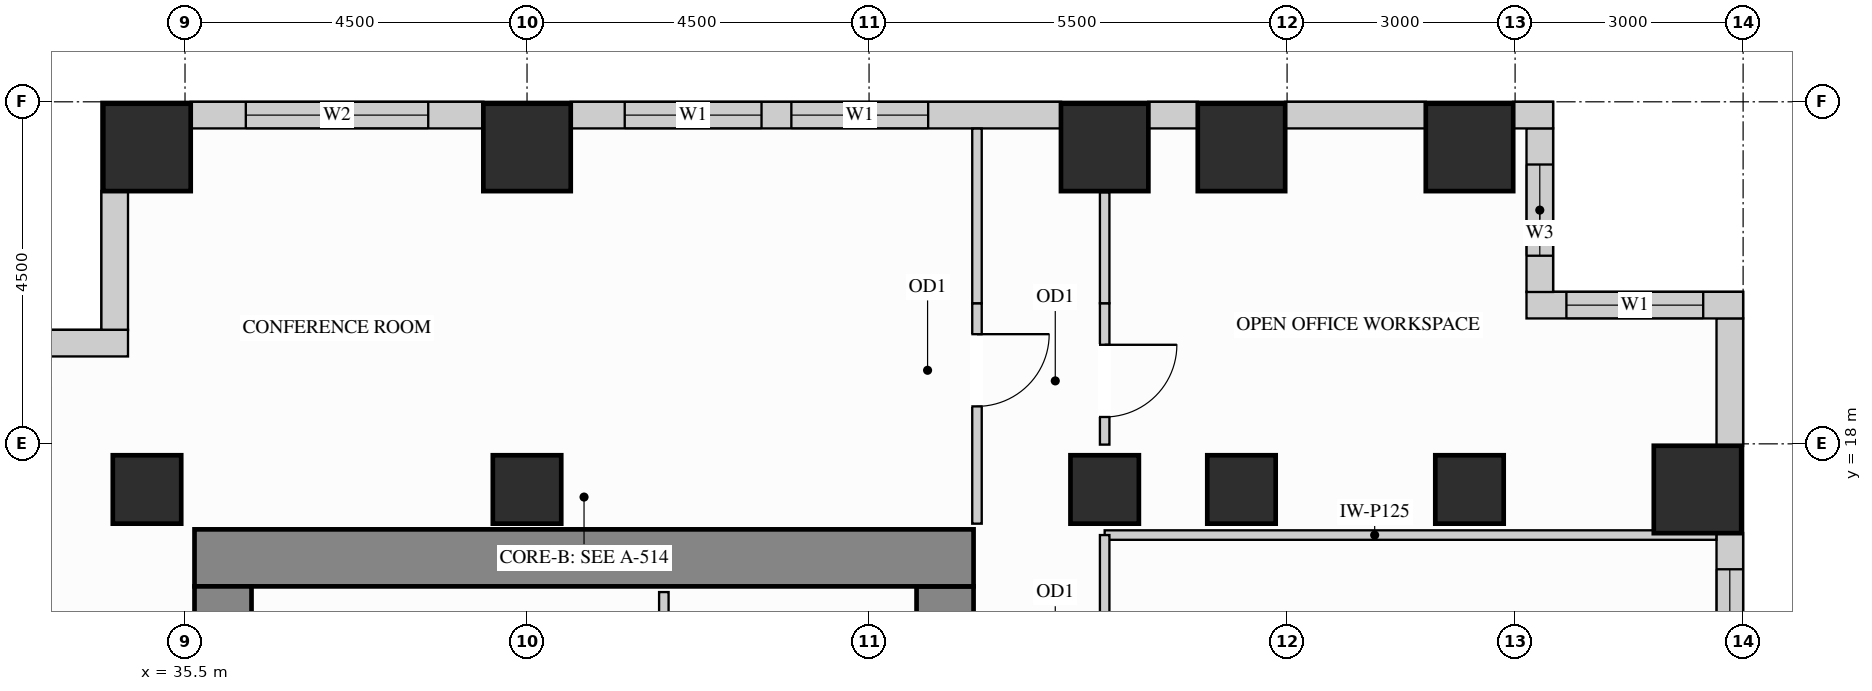
"""IFC4 building model, lengths in metres.
Left out: names, types, materials, properties, quantities, classifications, styles, units other than length and angle.
Written with IfcOpenShell. Run it as: python <this file> out.ifc"""

import sys

from ifc_helpers import new_model, si_unit, direction, frame, frame_2d, origin, origin_2d, place, context, subcontext, project, spatial, rectangle, extrude, source, transform, mapped, element, fill, save


model = new_model("IFC4")
c1 = context("Model", 3, precision=1e-05, world=origin(), true_north=direction((0.0, 1.0)))
c2 = subcontext(c1, "Body", "Model", "MODEL_VIEW")
j1 = project(units=[si_unit("LENGTHUNIT", "METRE"), si_unit("PLANEANGLEUNIT", "RADIAN")], contexts=[c1])
p1 = place(None, origin())
s1 = spatial("IfcSite", under=j1, at=p1, CompositionType="ELEMENT")
p2 = place(p1, origin())
s2 = spatial("IfcBuilding", under=s1, at=p2, CompositionType="ELEMENT")
p3 = place(p2, frame((0.0, 0.0, 131.4)))
s3 = spatial("IfcBuildingStorey", under=s2, at=p3, CompositionType="ELEMENT", Elevation=131.4)
m1 = source(origin(), c2, "Body", "SweptSolid", [
    extrude(rectangle(XDim=0.9, YDim=0.9, at=origin_2d()), origin(), (0.0, 0.0, 1.0), 3.38),
])
for number, where, z_axis, x_axis in (
    (1, (35.0, 17.4, 0.0), (0.0, 0.0, 1.0), (1.0, 0.0, 0.0)),
    (2, (40.0, 17.4, 0.0), (0.0, 0.0, 1.0), (1.0, 0.0, 0.0)),
    (3, (47.6, 17.4, 0.0), (0.0, 0.0, 1.0), (1.0, 0.0, 0.0)),
    (4, (49.4, 17.4, 0.0), (0.0, 0.0, 1.0), (1.0, 0.0, 0.0)),
    (5, (52.4, 17.4, 0.0), (0.0, 0.0, 1.0), (1.0, 0.0, 0.0)),
):
    element("IfcColumn", number, at=place(p3, frame(where, z_axis=z_axis, x_axis=x_axis)), inside=s3, PredefinedType="COLUMN", context=c2, shape_type="MappedRepresentation", body=[
        mapped(m1, transform((0.0, 0.0, 0.0), x_axis=(1.0, 0.0, 0.0), y_axis=(0.0, 1.0, 0.0), z_axis=(0.0, 0.0, 1.0))),
    ])
m2 = source(origin(), c2, "Body", "SweptSolid", [
    extrude(rectangle(XDim=1.15, YDim=1.15, at=origin_2d()), origin(), (0.0, 0.0, 1.0), 3.38),
])
for number, where, z_axis, x_axis in (
    (6, (35.0, 21.9, 0.0), (0.0, 0.0, 1.0), (1.0, 0.0, 0.0)),
    (7, (40.0, 21.9, 0.0), (0.0, 0.0, 1.0), (1.0, 0.0, 0.0)),
    (8, (47.6, 21.9, 0.0), (0.0, 0.0, 1.0), (1.0, 0.0, 0.0)),
    (9, (49.4, 21.9, 0.0), (0.0, 0.0, 1.0), (1.0, 0.0, 0.0)),
    (10, (52.4, 21.9, 0.0), (0.0, 0.0, 1.0), (1.0, 0.0, 0.0)),
    (11, (55.4, 17.4, 0.0), (0.0, 0.0, 1.0), (1.0, 0.0, 0.0)),
):
    element("IfcColumn", number, at=place(p3, frame(where, z_axis=z_axis, x_axis=x_axis)), inside=s3, PredefinedType="COLUMN", context=c2, shape_type="MappedRepresentation", body=[
        mapped(m2, transform((0.0, 0.0, 0.0), x_axis=(1.0, 0.0, 0.0), y_axis=(0.0, 1.0, 0.0), z_axis=(0.0, 0.0, 1.0))),
    ])
m3 = source(origin(), c2, "Body", "SweptSolid", [
    extrude(rectangle(XDim=3.725, YDim=0.75, at=frame_2d((1.863, 0.0))), origin(), (0.0, 0.0, 1.0), 3.38),
])
p4 = place(p3, frame((45.5, 12.4, 0.0), z_axis=(0.0, 0.0, 1.0), x_axis=(0.0, 1.0, 0.0)))
e12 = element("IfcWall", 12, at=p4, inside=s3, PredefinedType="SHEAR", context=c2, shape_type="MappedRepresentation", body=[
    mapped(m3, transform((0.0, 0.0, 0.0), x_axis=(1.0, 0.0, 0.0), y_axis=(0.0, 1.0, 0.0), z_axis=(0.0, 0.0, 1.0))),
])
m4 = source(origin(), c2, "Body", "SweptSolid", [
    extrude(rectangle(XDim=10.25, YDim=0.75, at=frame_2d((5.125, 0.0))), origin(), (0.0, 0.0, 1.0), 3.38),
])
p5 = place(p3, frame((35.625, 16.5, 0.0), z_axis=(0.0, 0.0, 1.0), x_axis=(1.0, 0.0, 0.0)))
e13 = element("IfcWall", 13, at=p5, inside=s3, PredefinedType="SHEAR", context=c2, shape_type="MappedRepresentation", body=[
    mapped(m4, transform((0.0, 0.0, 0.0), x_axis=(1.0, 0.0, 0.0), y_axis=(0.0, 1.0, 0.0), z_axis=(0.0, 0.0, 1.0))),
])
p6 = place(p3, frame((36.0, 12.4, 0.0), z_axis=(0.0, 0.0, 1.0), x_axis=(0.0, 1.0, 0.0)))
e14 = element("IfcWall", 14, at=p6, inside=s3, PredefinedType="SHEAR", context=c2, shape_type="MappedRepresentation", body=[
    mapped(m3, transform((0.0, 0.0, 0.0), x_axis=(1.0, 0.0, 0.0), y_axis=(0.0, 1.0, 0.0), z_axis=(0.0, 0.0, 1.0))),
])
p7 = place(p3, frame((55.825, 14.073, 0.0), z_axis=(0.0, 0.0, 1.0), x_axis=(0.0, 1.0, 0.0)))
e15 = element("IfcWall", 15, at=p7, inside=s3, PredefinedType="SOLIDWALL", context=c2, shape_type="SweptSolid", body=[
    extrude(rectangle(XDim=2.754, YDim=0.35, at=frame_2d((1.377, 0.0))), origin(), (0.0, 0.0, 1.0), 3.365),
])
p8 = place(p7, frame((0.477, 0.0, 0.78)))
e16 = element("IfcOpeningElement", 16, at=p8, cuts=e15, PredefinedType="OPENING", context=c2, shape_type="SweptSolid", body=[
    extrude(rectangle(XDim=1.8, YDim=2.1, at=frame_2d((0.9, 1.05))), frame((0.0, 0.185, 0.0), z_axis=(0.0, -1.0, 0.0), x_axis=(1.0, 0.0, 0.0)), (0.0, 0.0, 1.0), 0.37),
])
m5 = source(origin(), c2, "Body", "SweptSolid", [
    extrude(rectangle(XDim=1.679, YDim=0.35, at=frame_2d((0.84, 0.0))), origin(), (0.0, 0.0, 1.0), 3.365),
])
p9 = place(p3, frame((55.825, 17.973, 0.0), z_axis=(0.0, 0.0, 1.0), x_axis=(0.0, 1.0, 0.0)))
e17 = element("IfcWall", 17, at=p9, inside=s3, PredefinedType="SOLIDWALL", context=c2, shape_type="MappedRepresentation", body=[
    mapped(m5, transform((0.0, 0.0, 0.0), x_axis=(1.0, 0.0, 0.0), y_axis=(0.0, 1.0, 0.0), z_axis=(0.0, 0.0, 1.0))),
])
p10 = place(p3, frame((56.0, 19.825, 0.0), z_axis=(0.0, 0.0, 1.0), x_axis=(-1.0, 0.0, 0.0)))
e18 = element("IfcWall", 18, at=p10, inside=s3, PredefinedType="SOLIDWALL", context=c2, shape_type="SweptSolid", body=[
    extrude(rectangle(XDim=2.85, YDim=0.35, at=frame_2d((1.425, 0.0))), origin(), (0.0, 0.0, 1.0), 3.365),
])
p11 = place(p10, frame((0.525, 0.0, 0.78)))
e19 = element("IfcOpeningElement", 19, at=p11, cuts=e18, PredefinedType="OPENING", context=c2, shape_type="SweptSolid", body=[
    extrude(rectangle(XDim=1.8, YDim=2.1, at=frame_2d((0.9, 1.05))), frame((0.0, 0.185, 0.0), z_axis=(0.0, -1.0, 0.0), x_axis=(1.0, 0.0, 0.0)), (0.0, 0.0, 1.0), 0.37),
])
p12 = place(p3, frame((53.325, 19.998, 0.0), z_axis=(0.0, 0.0, 1.0), x_axis=(0.0, 1.0, 0.0)))
e20 = element("IfcWall", 20, at=p12, inside=s3, PredefinedType="SOLIDWALL", context=c2, shape_type="SweptSolid", body=[
    extrude(rectangle(XDim=2.154, YDim=0.35, at=frame_2d((1.077, 0.0))), origin(), (0.0, 0.0, 1.0), 3.365),
])
p13 = place(p12, frame((0.477, 0.0, 0.78)))
e21 = element("IfcOpeningElement", 21, at=p13, cuts=e20, PredefinedType="OPENING", context=c2, shape_type="SweptSolid", body=[
    extrude(rectangle(XDim=1.2, YDim=2.1, at=frame_2d((0.6, 1.05))), frame((0.0, 0.185, 0.0), z_axis=(0.0, -1.0, 0.0), x_axis=(1.0, 0.0, 0.0)), (0.0, 0.0, 1.0), 0.37),
])
m6 = source(origin(), c2, "Body", "SweptSolid", [
    extrude(rectangle(XDim=0.527, YDim=0.35, at=frame_2d((0.264, 0.0))), origin(), (0.0, 0.0, 1.0), 3.365),
])
p14 = place(p3, frame((53.5, 22.325, 0.0), z_axis=(0.0, 0.0, 1.0), x_axis=(-1.0, 0.0, 0.0)))
e22 = element("IfcWall", 22, at=p14, inside=s3, PredefinedType="SOLIDWALL", context=c2, shape_type="MappedRepresentation", body=[
    mapped(m6, transform((0.0, 0.0, 0.0), x_axis=(1.0, 0.0, 0.0), y_axis=(0.0, 1.0, 0.0), z_axis=(0.0, 0.0, 1.0))),
])
m7 = source(origin(), c2, "Body", "SweptSolid", [
    extrude(rectangle(XDim=1.854, YDim=0.35, at=frame_2d((0.927, 0.0))), origin(), (0.0, 0.0, 1.0), 3.365),
])
p15 = place(p3, frame((51.827, 22.325, 0.0), z_axis=(0.0, 0.0, 1.0), x_axis=(-1.0, 0.0, 0.0)))
e23 = element("IfcWall", 23, at=p15, inside=s3, PredefinedType="SOLIDWALL", context=c2, shape_type="MappedRepresentation", body=[
    mapped(m7, transform((0.0, 0.0, 0.0), x_axis=(1.0, 0.0, 0.0), y_axis=(0.0, 1.0, 0.0), z_axis=(0.0, 0.0, 1.0))),
])
m8 = source(origin(), c2, "Body", "SweptSolid", [
    extrude(rectangle(XDim=0.654, YDim=0.35, at=frame_2d((0.327, 0.0))), origin(), (0.0, 0.0, 1.0), 3.365),
])
p16 = place(p3, frame((48.827, 22.325, 0.0), z_axis=(0.0, 0.0, 1.0), x_axis=(-1.0, 0.0, 0.0)))
e24 = element("IfcWall", 24, at=p16, inside=s3, PredefinedType="SOLIDWALL", context=c2, shape_type="MappedRepresentation", body=[
    mapped(m8, transform((0.0, 0.0, 0.0), x_axis=(1.0, 0.0, 0.0), y_axis=(0.0, 1.0, 0.0), z_axis=(0.0, 0.0, 1.0))),
])
p17 = place(p3, frame((47.027, 22.325, 0.0), z_axis=(0.0, 0.0, 1.0), x_axis=(-1.0, 0.0, 0.0)))
e25 = element("IfcWall", 25, at=p17, inside=s3, PredefinedType="SOLIDWALL", context=c2, shape_type="SweptSolid", body=[
    extrude(rectangle(XDim=6.454, YDim=0.35, at=frame_2d((3.227, 0.0))), origin(), (0.0, 0.0, 1.0), 3.365),
])
p18 = place(p17, frame((1.749, 0.0, 0.78)))
e26 = element("IfcOpeningElement", 26, at=p18, cuts=e25, PredefinedType="OPENING", context=c2, shape_type="SweptSolid", body=[
    extrude(rectangle(XDim=1.8, YDim=2.1, at=frame_2d((0.9, 1.05))), frame((0.0, 0.185, 0.0), z_axis=(0.0, -1.0, 0.0), x_axis=(1.0, 0.0, 0.0)), (0.0, 0.0, 1.0), 0.37),
])
p19 = place(p17, frame((3.942, 0.0, 0.78)))
e27 = element("IfcOpeningElement", 27, at=p19, cuts=e25, PredefinedType="OPENING", context=c2, shape_type="SweptSolid", body=[
    extrude(rectangle(XDim=1.8, YDim=2.1, at=frame_2d((0.9, 1.05))), frame((0.0, 0.185, 0.0), z_axis=(0.0, -1.0, 0.0), x_axis=(1.0, 0.0, 0.0)), (0.0, 0.0, 1.0), 0.37),
])
p20 = place(p3, frame((39.427, 22.325, 0.0), z_axis=(0.0, 0.0, 1.0), x_axis=(-1.0, 0.0, 0.0)))
e28 = element("IfcWall", 28, at=p20, inside=s3, PredefinedType="SOLIDWALL", context=c2, shape_type="SweptSolid", body=[
    extrude(rectangle(XDim=3.854, YDim=0.35, at=frame_2d((1.927, 0.0))), origin(), (0.0, 0.0, 1.0), 3.365),
])
p21 = place(p20, frame((0.727, 0.0, 0.78)))
e29 = element("IfcOpeningElement", 29, at=p21, cuts=e28, PredefinedType="OPENING", context=c2, shape_type="SweptSolid", body=[
    extrude(rectangle(XDim=2.4, YDim=2.1, at=frame_2d((1.2, 1.05))), frame((0.0, 0.185, 0.0), z_axis=(0.0, -1.0, 0.0), x_axis=(1.0, 0.0, 0.0)), (0.0, 0.0, 1.0), 0.37),
])
m9 = source(origin(), c2, "Body", "SweptSolid", [
    extrude(rectangle(XDim=1.829, YDim=0.35, at=frame_2d((0.915, 0.0))), origin(), (0.0, 0.0, 1.0), 3.365),
])
p22 = place(p3, frame((34.575, 21.327, 0.0), z_axis=(0.0, 0.0, 1.0), x_axis=(0.0, -1.0, 0.0)))
e30 = element("IfcWall", 30, at=p22, inside=s3, PredefinedType="SOLIDWALL", context=c2, shape_type="MappedRepresentation", body=[
    mapped(m9, transform((0.0, 0.0, 0.0), x_axis=(1.0, 0.0, 0.0), y_axis=(0.0, 1.0, 0.0), z_axis=(0.0, 0.0, 1.0))),
])
p23 = place(p3, frame((34.75, 19.325, 0.0), z_axis=(0.0, 0.0, 1.0), x_axis=(-1.0, 0.0, 0.0)))
e31 = element("IfcWall", 31, at=p23, inside=s3, PredefinedType="SOLIDWALL", context=c2, shape_type="SweptSolid", body=[
    extrude(rectangle(XDim=15.6, YDim=0.35, at=frame_2d((7.8, 0.0))), origin(), (0.0, 0.0, 1.0), 3.365),
])
p24 = place(p23, frame((4.307, 0.0, 0.78)))
e32 = element("IfcOpeningElement", 32, at=p24, cuts=e31, PredefinedType="OPENING", context=c2, shape_type="SweptSolid", body=[
    extrude(rectangle(XDim=1.5, YDim=2.0, at=frame_2d((0.75, 1.0))), frame((0.0, 0.185, 0.0), z_axis=(0.0, -1.0, 0.0), x_axis=(1.0, 0.0, 0.0)), (0.0, 0.0, 1.0), 0.37),
])
p25 = place(p23, frame((9.793, 0.0, 0.78)))
e33 = element("IfcOpeningElement", 33, at=p25, cuts=e31, PredefinedType="OPENING", context=c2, shape_type="SweptSolid", body=[
    extrude(rectangle(XDim=1.5, YDim=2.0, at=frame_2d((0.75, 1.0))), frame((0.0, 0.185, 0.0), z_axis=(0.0, -1.0, 0.0), x_axis=(1.0, 0.0, 0.0)), (0.0, 0.0, 1.0), 0.37),
])
m10 = source(origin(), c2, "Body", "SweptSolid", [
    extrude(rectangle(XDim=1.93, YDim=0.125, at=frame_2d((0.965, 0.0))), origin(), (0.0, 0.0, 1.0), 3.365),
])
p26 = place(p3, frame((41.8, 14.12, 0.0), z_axis=(0.0, 0.0, 1.0), x_axis=(0.0, 1.0, 0.0)))
e34 = element("IfcWall", 34, at=p26, inside=s3, PredefinedType="PARTITIONING", context=c2, shape_type="MappedRepresentation", body=[
    mapped(m10, transform((0.0, 0.0, 0.0), x_axis=(1.0, 0.0, 0.0), y_axis=(0.0, 1.0, 0.0), z_axis=(0.0, 0.0, 1.0))),
])
m11 = source(origin(), c2, "Body", "SweptSolid", [
    extrude(rectangle(XDim=8.048, YDim=0.125, at=frame_2d((4.024, 0.0))), origin(), (0.0, 0.0, 1.0), 3.365),
])
p27 = place(p3, frame((47.6, 16.8, 0.0), z_axis=(0.0, 0.0, 1.0), x_axis=(1.0, 0.0, 0.0)))
e35 = element("IfcWall", 35, at=p27, inside=s3, PredefinedType="PARTITIONING", context=c2, shape_type="MappedRepresentation", body=[
    mapped(m11, transform((0.0, 0.0, 0.0), x_axis=(1.0, 0.0, 0.0), y_axis=(0.0, 1.0, 0.0), z_axis=(0.0, 0.0, 1.0))),
])
p28 = place(p3, frame((47.6, 14.09, 0.0), z_axis=(0.0, 0.0, 1.0), x_axis=(0.0, 1.0, 0.0)))
e36 = element("IfcWall", 36, at=p28, inside=s3, PredefinedType="PARTITIONING", context=c2, shape_type="SweptSolid", body=[
    extrude(rectangle(XDim=2.71, YDim=0.125, at=frame_2d((1.355, 0.0))), origin(), (0.0, 0.0, 1.0), 2.677),
])
p29 = place(p28, frame((0.38, 0.0, 0.0)))
e37 = element("IfcOpeningElement", 37, at=p29, cuts=e36, PredefinedType="OPENING", context=c2, shape_type="SweptSolid", body=[
    extrude(rectangle(XDim=0.95, YDim=2.15, at=frame_2d((0.475, 1.075))), frame((0.0, 0.073, 0.0), z_axis=(0.0, -1.0, 0.0), x_axis=(1.0, 0.0, 0.0)), (0.0, 0.0, 1.0), 0.145),
])
p30 = place(p3, frame((47.6, 17.99, 0.0), z_axis=(0.0, 0.0, 1.0), x_axis=(0.0, 1.0, 0.0)))
e38 = element("IfcWall", 38, at=p30, inside=s3, PredefinedType="PARTITIONING", context=c2, shape_type="SweptSolid", body=[
    extrude(rectangle(XDim=1.86, YDim=0.125, at=frame_2d((0.93, 0.0))), origin(), (0.0, 0.0, 1.0), 2.677),
])
p31 = place(p30, frame((0.363, 0.0, 0.0)))
e39 = element("IfcOpeningElement", 39, at=p31, cuts=e38, PredefinedType="OPENING", context=c2, shape_type="SweptSolid", body=[
    extrude(rectangle(XDim=0.95, YDim=2.15, at=frame_2d((0.475, 1.075))), frame((0.0, 0.073, 0.0), z_axis=(0.0, -1.0, 0.0), x_axis=(1.0, 0.0, 0.0)), (0.0, 0.0, 1.0), 0.145),
])
m12 = source(origin(), c2, "Body", "SweptSolid", [
    extrude(rectangle(XDim=1.46, YDim=0.125, at=frame_2d((0.73, 0.0))), origin(), (0.0, 0.0, 1.0), 2.677),
])
p32 = place(p3, frame((47.6, 19.85, 0.0), z_axis=(0.0, 0.0, 1.0), x_axis=(0.0, 1.0, 0.0)))
e40 = element("IfcWall", 40, at=p32, inside=s3, PredefinedType="PARTITIONING", context=c2, shape_type="MappedRepresentation", body=[
    mapped(m12, transform((0.0, 0.0, 0.0), x_axis=(1.0, 0.0, 0.0), y_axis=(0.0, 1.0, 0.0), z_axis=(0.0, 0.0, 1.0))),
])
p33 = place(p3, frame((45.92, 16.95, 0.0), z_axis=(0.0, 0.0, 1.0), x_axis=(0.0, 1.0, 0.0)))
e41 = element("IfcWall", 41, at=p33, inside=s3, PredefinedType="PARTITIONING", context=c2, shape_type="SweptSolid", body=[
    extrude(rectangle(XDim=2.9, YDim=0.125, at=frame_2d((1.45, 0.0))), origin(), (0.0, 0.0, 1.0), 3.365),
])
p34 = place(p33, frame((1.543, 0.0, 0.0)))
e42 = element("IfcOpeningElement", 42, at=p34, cuts=e41, PredefinedType="OPENING", context=c2, shape_type="SweptSolid", body=[
    extrude(rectangle(XDim=0.95, YDim=2.15, at=frame_2d((0.475, 1.075))), frame((0.0, 0.073, 0.0), z_axis=(0.0, -1.0, 0.0), x_axis=(1.0, 0.0, 0.0)), (0.0, 0.0, 1.0), 0.145),
])
m13 = source(origin(), c2, "Body", "SweptSolid", [
    extrude(rectangle(XDim=2.298, YDim=0.125, at=frame_2d((1.149, 0.0))), origin(), (0.0, 0.0, 1.0), 3.365),
])
p35 = place(p3, frame((45.92, 19.85, 0.0), z_axis=(0.0, 0.0, 1.0), x_axis=(0.0, 1.0, 0.0)))
e43 = element("IfcWall", 43, at=p35, inside=s3, PredefinedType="PARTITIONING", context=c2, shape_type="MappedRepresentation", body=[
    mapped(m13, transform((0.0, 0.0, 0.0), x_axis=(1.0, 0.0, 0.0), y_axis=(0.0, 1.0, 0.0), z_axis=(0.0, 0.0, 1.0))),
])
m14 = source(origin(), c2, "Body", "SweptSolid", [
    extrude(rectangle(XDim=0.95, YDim=2.15, at=frame_2d((0.475, 1.075))), frame((0.0, 0.025, 0.0), z_axis=(0.0, -1.0, 0.0), x_axis=(1.0, 0.0, 0.0)), (0.0, 0.0, 1.0), 0.05),
])
p36 = place(p34, origin())
e44 = element("IfcDoor", 44, at=p36, inside=s3, OperationType="SINGLE_SWING_RIGHT", PredefinedType="DOOR", context=c2, shape_type="MappedRepresentation", body=[
    mapped(m14, transform((0.0, 0.0, 0.0), x_axis=(1.0, 0.0, 0.0), y_axis=(0.0, 1.0, 0.0), z_axis=(0.0, 0.0, 1.0))),
])
fill(e42, e44)
p37 = place(p31, origin())
e45 = element("IfcDoor", 45, at=p37, inside=s3, OperationType="SINGLE_SWING_RIGHT", PredefinedType="DOOR", context=c2, shape_type="MappedRepresentation", body=[
    mapped(m14, transform((0.0, 0.0, 0.0), x_axis=(1.0, 0.0, 0.0), y_axis=(0.0, 1.0, 0.0), z_axis=(0.0, 0.0, 1.0))),
])
fill(e39, e45)
m15 = source(origin(), c2, "Body", "SweptSolid", [
    extrude(rectangle(XDim=1.8, YDim=2.1, at=frame_2d((0.9, 1.05))), frame((0.0, 0.03, 0.0), z_axis=(0.0, -1.0, 0.0), x_axis=(1.0, 0.0, 0.0)), (0.0, 0.0, 1.0), 0.06),
])
p38 = place(p8, origin())
e46 = element("IfcWindow", 46, at=p38, inside=s3, PartitioningType="SINGLE_PANEL", PredefinedType="WINDOW", context=c2, shape_type="MappedRepresentation", body=[
    mapped(m15, transform((0.0, 0.0, 0.0), x_axis=(1.0, 0.0, 0.0), y_axis=(0.0, 1.0, 0.0), z_axis=(0.0, 0.0, 1.0))),
])
fill(e16, e46)
p39 = place(p11, origin())
e47 = element("IfcWindow", 47, at=p39, inside=s3, PartitioningType="SINGLE_PANEL", PredefinedType="WINDOW", context=c2, shape_type="MappedRepresentation", body=[
    mapped(m15, transform((0.0, 0.0, 0.0), x_axis=(1.0, 0.0, 0.0), y_axis=(0.0, 1.0, 0.0), z_axis=(0.0, 0.0, 1.0))),
])
fill(e19, e47)
p40 = place(p18, origin())
e48 = element("IfcWindow", 48, at=p40, inside=s3, PartitioningType="SINGLE_PANEL", PredefinedType="WINDOW", context=c2, shape_type="MappedRepresentation", body=[
    mapped(m15, transform((0.0, 0.0, 0.0), x_axis=(1.0, 0.0, 0.0), y_axis=(0.0, 1.0, 0.0), z_axis=(0.0, 0.0, 1.0))),
])
fill(e26, e48)
p41 = place(p19, origin())
e49 = element("IfcWindow", 49, at=p41, inside=s3, PartitioningType="SINGLE_PANEL", PredefinedType="WINDOW", context=c2, shape_type="MappedRepresentation", body=[
    mapped(m15, transform((0.0, 0.0, 0.0), x_axis=(1.0, 0.0, 0.0), y_axis=(0.0, 1.0, 0.0), z_axis=(0.0, 0.0, 1.0))),
])
fill(e27, e49)
m16 = source(origin(), c2, "Body", "SweptSolid", [
    extrude(rectangle(XDim=2.4, YDim=2.1, at=frame_2d((1.2, 1.05))), frame((0.0, 0.03, 0.0), z_axis=(0.0, -1.0, 0.0), x_axis=(1.0, 0.0, 0.0)), (0.0, 0.0, 1.0), 0.06),
])
p42 = place(p21, origin())
e50 = element("IfcWindow", 50, at=p42, inside=s3, PartitioningType="SINGLE_PANEL", PredefinedType="WINDOW", context=c2, shape_type="MappedRepresentation", body=[
    mapped(m16, transform((0.0, 0.0, 0.0), x_axis=(1.0, 0.0, 0.0), y_axis=(0.0, 1.0, 0.0), z_axis=(0.0, 0.0, 1.0))),
])
fill(e29, e50)
m17 = source(origin(), c2, "Body", "SweptSolid", [
    extrude(rectangle(XDim=1.2, YDim=2.1, at=frame_2d((0.6, 1.05))), frame((0.0, 0.03, 0.0), z_axis=(0.0, -1.0, 0.0), x_axis=(1.0, 0.0, 0.0)), (0.0, 0.0, 1.0), 0.06),
])
p43 = place(p13, origin())
e51 = element("IfcWindow", 51, at=p43, inside=s3, PartitioningType="SINGLE_PANEL", PredefinedType="WINDOW", context=c2, shape_type="MappedRepresentation", body=[
    mapped(m17, transform((0.0, 0.0, 0.0), x_axis=(1.0, 0.0, 0.0), y_axis=(0.0, 1.0, 0.0), z_axis=(0.0, 0.0, 1.0))),
])
fill(e21, e51)
save(model, sys.argv[1])
